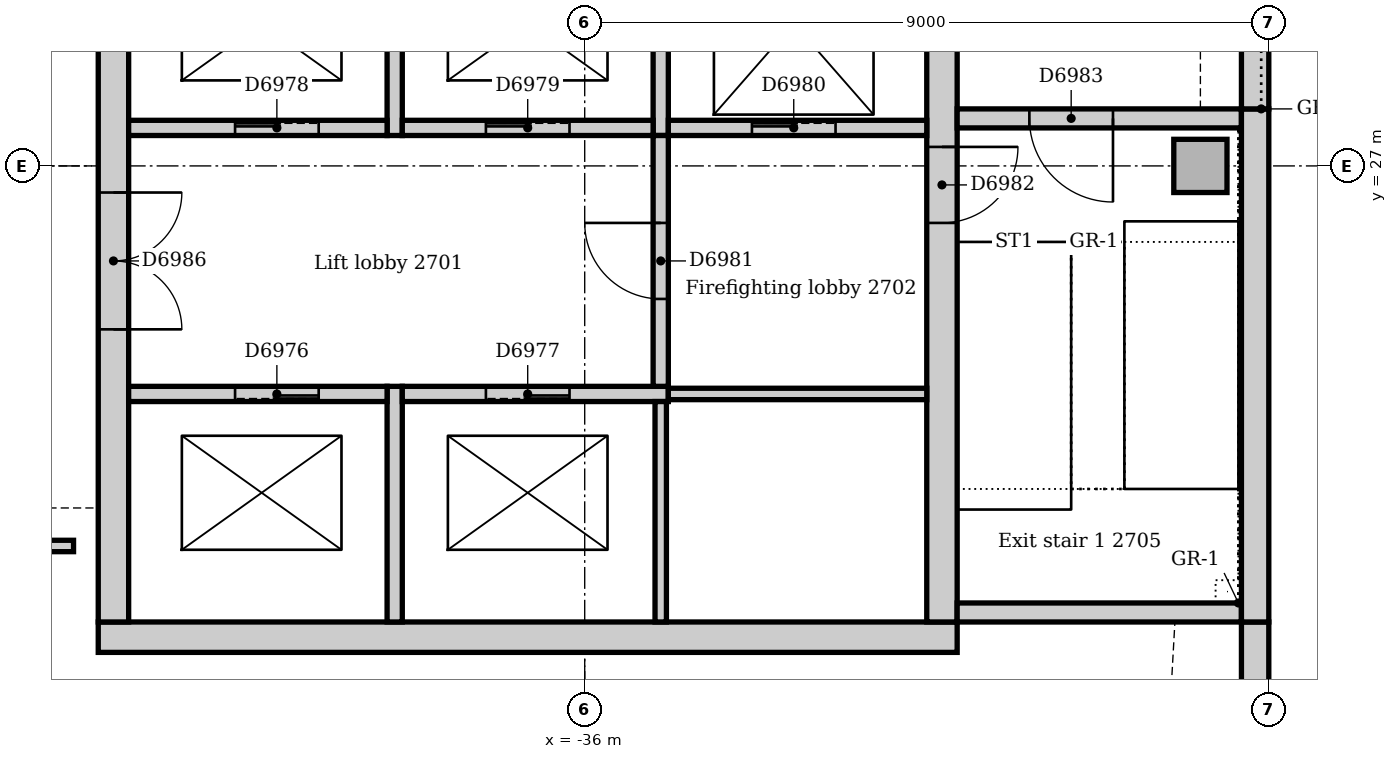
"""IFC4 building model, lengths in metres.
Left out: names, types, materials, properties, quantities, classifications, styles, units other than length and angle.
Written with IfcOpenShell. Run it as: python <this file> out.ifc"""

import sys

from ifc_helpers import new_model, si_unit, direction, frame, frame_2d, origin, origin_2d, place, context, subcontext, project, spatial, rectangle, extrude, element, fill, save


model = new_model("IFC4")
c1 = context("Model", 3, precision=1e-05, world=origin(), true_north=direction((0.0, 1.0)))
c2 = subcontext(c1, "Body", "Model", "MODEL_VIEW")
j1 = project(units=[si_unit("LENGTHUNIT", "METRE"), si_unit("PLANEANGLEUNIT", "RADIAN")], contexts=[c1])
p1 = place(None, origin())
s1 = spatial("IfcSite", under=j1, at=p1, CompositionType="ELEMENT")
p2 = place(p1, origin())
s2 = spatial("IfcBuilding", under=s1, at=p2, CompositionType="ELEMENT")
p3 = place(p2, frame((0.0, 0.0, 116.0)))
s3 = spatial("IfcBuildingStorey", under=s2, at=p3, CompositionType="ELEMENT", Elevation=116.0)
p4 = place(p3, frame((-42.4, 20.8, 0.0), z_axis=(0.0, 0.0, 1.0), x_axis=(1.0, 0.0, 0.0)))
e1 = element("IfcWall", 1, at=p4, inside=s3, PredefinedType="SOLIDWALL", context=c2, shape_type="SweptSolid", body=[
    extrude(rectangle(XDim=11.3, YDim=0.4, at=frame_2d((5.65, 0.0))), origin(), (0.0, 0.0, 1.0), 4.0),
])
p5 = place(p3, frame((-31.3, 21.0, 0.0), z_axis=(0.0, 0.0, 1.0), x_axis=(0.0, 1.0, 0.0)))
e2 = element("IfcWall", 2, at=p5, inside=s3, PredefinedType="SOLIDWALL", context=c2, shape_type="SweptSolid", body=[
    extrude(rectangle(XDim=9.5, YDim=0.4, at=frame_2d((4.75, 0.0))), origin(), (0.0, 0.0, 1.0), 4.0),
])
p6 = place(p5, frame((5.25, 0.0, 0.0)))
e3 = element("IfcOpeningElement", 3, at=p6, cuts=e2, PredefinedType="OPENING", context=c2, shape_type="SweptSolid", body=[
    extrude(rectangle(XDim=1.0, YDim=2.1, at=frame_2d((0.5, 1.05))), frame((0.0, 0.21, 0.0), z_axis=(0.0, -1.0, 0.0), x_axis=(1.0, 0.0, 0.0)), (0.0, 0.0, 1.0), 0.42),
])
p7 = place(p3, frame((-42.2, 30.5, 0.0), z_axis=(0.0, 0.0, 1.0), x_axis=(0.0, -1.0, 0.0)))
e4 = element("IfcWall", 4, at=p7, inside=s3, PredefinedType="SOLIDWALL", context=c2, shape_type="SweptSolid", body=[
    extrude(rectangle(XDim=9.5, YDim=0.4, at=frame_2d((4.75, 0.0))), origin(), (0.0, 0.0, 1.0), 4.0),
])
p8 = place(p7, frame((3.85, 0.0, 0.0)))
e5 = element("IfcOpeningElement", 5, at=p8, cuts=e4, PredefinedType="OPENING", context=c2, shape_type="SweptSolid", body=[
    extrude(rectangle(XDim=1.8, YDim=2.1, at=frame_2d((0.9, 1.05))), frame((0.0, 0.21, 0.0), z_axis=(0.0, -1.0, 0.0), x_axis=(1.0, 0.0, 0.0)), (0.0, 0.0, 1.0), 0.42),
])
p9 = place(p3, frame((-31.1, 21.125, 0.0), z_axis=(0.0, 0.0, 1.0), x_axis=(1.0, 0.0, 0.0)))
e6 = element("IfcWall", 6, at=p9, inside=s3, PredefinedType="SOLIDWALL", context=c2, shape_type="SweptSolid", body=[
    extrude(rectangle(XDim=3.74, YDim=0.25, at=frame_2d((1.87, 0.0))), origin(), (0.0, 0.0, 1.0), 4.0),
])
p10 = place(p3, frame((-27.36, 27.625, 0.0), z_axis=(0.0, 0.0, 1.0), x_axis=(-1.0, 0.0, 0.0)))
e7 = element("IfcWall", 7, at=p10, inside=s3, PredefinedType="SOLIDWALL", context=c2, shape_type="SweptSolid", body=[
    extrude(rectangle(XDim=3.74, YDim=0.25, at=frame_2d((1.87, 0.0))), origin(), (0.0, 0.0, 1.0), 4.0),
])
p11 = place(p10, frame((1.69, 0.0, 0.0)))
e8 = element("IfcOpeningElement", 8, at=p11, cuts=e7, PredefinedType="OPENING", context=c2, shape_type="SweptSolid", body=[
    extrude(rectangle(XDim=1.1, YDim=2.1, at=frame_2d((0.55, 1.05))), frame((0.0, 0.135, 0.0), z_axis=(0.0, -1.0, 0.0), x_axis=(1.0, 0.0, 0.0)), (0.0, 0.0, 1.0), 0.27),
])
p12 = place(p3, frame((-27.9, 27.0, 0.0), z_axis=(0.0, 0.0, 1.0), x_axis=(1.0, 0.0, 0.0)))
e9 = element("IfcColumn", 9, at=p12, inside=s3, PredefinedType="COLUMN", context=c2, shape_type="SweptSolid", body=[
    extrude(rectangle(XDim=0.7, YDim=0.7, at=origin_2d()), origin(), (0.0, 0.0, 1.0), 4.0),
])
p13 = place(p3, frame((-27.18, 17.743, 0.0), z_axis=(0.0, 0.0, 1.0), x_axis=(0.0, 1.0, 0.0)))
e10 = element("IfcWall", 10, at=p13, inside=s3, PredefinedType="STANDARD", context=c2, shape_type="SweptSolid", body=[
    extrude(rectangle(XDim=3.257, YDim=0.36, at=frame_2d((1.629, 0.0))), origin(), (0.0, 0.0, 1.0), 3.85),
])
p14 = place(p3, frame((-27.18, 21.0, 0.0), z_axis=(0.0, 0.0, 1.0), x_axis=(0.0, 1.0, 0.0)))
e11 = element("IfcWall", 11, at=p14, inside=s3, PredefinedType="STANDARD", context=c2, shape_type="SweptSolid", body=[
    extrude(rectangle(XDim=6.75, YDim=0.36, at=frame_2d((3.375, 0.0))), origin(), (0.0, 0.0, 1.0), 3.85),
])
p15 = place(p3, frame((-27.18, 27.75, 0.0), z_axis=(0.0, 0.0, 1.0), x_axis=(0.0, 1.0, 0.0)))
e12 = element("IfcWall", 12, at=p15, inside=s3, PredefinedType="STANDARD", context=c2, shape_type="SweptSolid", body=[
    extrude(rectangle(XDim=7.5, YDim=0.36, at=frame_2d((3.75, 0.0))), origin(), (0.0, 0.0, 1.0), 3.85),
])
p16 = place(p15, frame((2.85, 0.0, 1.2)))
e13 = element("IfcOpeningElement", 13, at=p16, cuts=e12, PredefinedType="OPENING", context=c2, shape_type="SweptSolid", body=[
    extrude(rectangle(XDim=1.8, YDim=1.2, at=frame_2d((0.9, 0.6))), frame((0.0, 0.19, 0.0), z_axis=(0.0, -1.0, 0.0), x_axis=(1.0, 0.0, 0.0)), (0.0, 0.0, 1.0), 0.38),
])
p17 = place(p3, frame((-38.5, 21.0, 0.0), z_axis=(0.0, 0.0, 1.0), x_axis=(0.0, 1.0, 0.0)))
e14 = element("IfcWall", 14, at=p17, inside=s3, PredefinedType="SOLIDWALL", context=c2, shape_type="SweptSolid", body=[
    extrude(rectangle(XDim=3.1, YDim=0.2, at=frame_2d((1.55, 0.0))), origin(), (0.0, 0.0, 1.0), 4.0),
])
p18 = place(p3, frame((-38.6, 24.0, 0.0), z_axis=(0.0, 0.0, 1.0), x_axis=(-1.0, 0.0, 0.0)))
e15 = element("IfcWall", 15, at=p18, inside=s3, PredefinedType="SOLIDWALL", context=c2, shape_type="SweptSolid", body=[
    extrude(rectangle(XDim=3.4, YDim=0.2, at=frame_2d((1.7, 0.0))), origin(), (0.0, 0.0, 1.0), 4.0),
])
p19 = place(p18, frame((0.9, 0.0, 0.0)))
e16 = element("IfcOpeningElement", 16, at=p19, cuts=e15, PredefinedType="OPENING", context=c2, shape_type="SweptSolid", body=[
    extrude(rectangle(XDim=1.1, YDim=2.1, at=frame_2d((0.55, 1.05))), frame((0.0, 0.11, 0.0), z_axis=(0.0, -1.0, 0.0), x_axis=(1.0, 0.0, 0.0)), (0.0, 0.0, 1.0), 0.22),
])
p20 = place(p3, frame((-34.9, 24.0, 0.0), z_axis=(0.0, 0.0, 1.0), x_axis=(-1.0, 0.0, 0.0)))
e17 = element("IfcWall", 17, at=p20, inside=s3, PredefinedType="SOLIDWALL", context=c2, shape_type="SweptSolid", body=[
    extrude(rectangle(XDim=3.5, YDim=0.2, at=frame_2d((1.75, 0.0))), origin(), (0.0, 0.0, 1.0), 4.0),
])
p21 = place(p20, frame((1.3, 0.0, 0.0)))
e18 = element("IfcOpeningElement", 18, at=p21, cuts=e17, PredefinedType="OPENING", context=c2, shape_type="SweptSolid", body=[
    extrude(rectangle(XDim=1.1, YDim=2.1, at=frame_2d((0.55, 1.05))), frame((0.0, 0.11, 0.0), z_axis=(0.0, -1.0, 0.0), x_axis=(1.0, 0.0, 0.0)), (0.0, 0.0, 1.0), 0.22),
])
p22 = place(p3, frame((-38.5, 27.4, 0.0), z_axis=(0.0, 0.0, 1.0), x_axis=(0.0, 1.0, 0.0)))
e19 = element("IfcWall", 19, at=p22, inside=s3, PredefinedType="SOLIDWALL", context=c2, shape_type="SweptSolid", body=[
    extrude(rectangle(XDim=2.85, YDim=0.2, at=frame_2d((1.425, 0.0))), origin(), (0.0, 0.0, 1.0), 4.0),
])
p23 = place(p3, frame((-42.0, 27.5, 0.0), z_axis=(0.0, 0.0, 1.0), x_axis=(1.0, 0.0, 0.0)))
e20 = element("IfcWall", 20, at=p23, inside=s3, PredefinedType="SOLIDWALL", context=c2, shape_type="SweptSolid", body=[
    extrude(rectangle(XDim=3.4, YDim=0.2, at=frame_2d((1.7, 0.0))), origin(), (0.0, 0.0, 1.0), 4.0),
])
p24 = place(p23, frame((1.4, 0.0, 0.0)))
e21 = element("IfcOpeningElement", 21, at=p24, cuts=e20, PredefinedType="OPENING", context=c2, shape_type="SweptSolid", body=[
    extrude(rectangle(XDim=1.1, YDim=2.1, at=frame_2d((0.55, 1.05))), frame((0.0, 0.11, 0.0), z_axis=(0.0, -1.0, 0.0), x_axis=(1.0, 0.0, 0.0)), (0.0, 0.0, 1.0), 0.22),
])
p25 = place(p3, frame((-35.0, 27.4, 0.0), z_axis=(0.0, 0.0, 1.0), x_axis=(0.0, 1.0, 0.0)))
e22 = element("IfcWall", 22, at=p25, inside=s3, PredefinedType="SOLIDWALL", context=c2, shape_type="SweptSolid", body=[
    extrude(rectangle(XDim=2.85, YDim=0.2, at=frame_2d((1.425, 0.0))), origin(), (0.0, 0.0, 1.0), 4.0),
])
p26 = place(p3, frame((-38.4, 27.5, 0.0), z_axis=(0.0, 0.0, 1.0), x_axis=(1.0, 0.0, 0.0)))
e23 = element("IfcWall", 23, at=p26, inside=s3, PredefinedType="SOLIDWALL", context=c2, shape_type="SweptSolid", body=[
    extrude(rectangle(XDim=3.3, YDim=0.2, at=frame_2d((1.65, 0.0))), origin(), (0.0, 0.0, 1.0), 4.0),
])
p27 = place(p26, frame((1.1, 0.0, 0.0)))
e24 = element("IfcOpeningElement", 24, at=p27, cuts=e23, PredefinedType="OPENING", context=c2, shape_type="SweptSolid", body=[
    extrude(rectangle(XDim=1.1, YDim=2.1, at=frame_2d((0.55, 1.05))), frame((0.0, 0.11, 0.0), z_axis=(0.0, -1.0, 0.0), x_axis=(1.0, 0.0, 0.0)), (0.0, 0.0, 1.0), 0.22),
])
p28 = place(p3, frame((-34.9, 27.5, 0.0), z_axis=(0.0, 0.0, 1.0), x_axis=(1.0, 0.0, 0.0)))
e25 = element("IfcWall", 25, at=p28, inside=s3, PredefinedType="SOLIDWALL", context=c2, shape_type="SweptSolid", body=[
    extrude(rectangle(XDim=3.4, YDim=0.2, at=frame_2d((1.7, 0.0))), origin(), (0.0, 0.0, 1.0), 4.0),
])
p29 = place(p28, frame((1.1, 0.0, 0.0)))
e26 = element("IfcOpeningElement", 26, at=p29, cuts=e25, PredefinedType="OPENING", context=c2, shape_type="SweptSolid", body=[
    extrude(rectangle(XDim=1.1, YDim=2.1, at=frame_2d((0.55, 1.05))), frame((0.0, 0.11, 0.0), z_axis=(0.0, -1.0, 0.0), x_axis=(1.0, 0.0, 0.0)), (0.0, 0.0, 1.0), 0.22),
])
p30 = place(p3, frame((-35.0, 24.1, 0.0), z_axis=(0.0, 0.0, 1.0), x_axis=(0.0, 1.0, 0.0)))
e27 = element("IfcWall", 27, at=p30, inside=s3, PredefinedType="SOLIDWALL", context=c2, shape_type="SweptSolid", body=[
    extrude(rectangle(XDim=3.3, YDim=0.2, at=frame_2d((1.65, 0.0))), origin(), (0.0, 0.0, 1.0), 4.0),
])
p31 = place(p30, frame((1.15, 0.0, 0.0)))
e28 = element("IfcOpeningElement", 28, at=p31, cuts=e27, PredefinedType="OPENING", context=c2, shape_type="SweptSolid", body=[
    extrude(rectangle(XDim=1.0, YDim=2.1, at=frame_2d((0.5, 1.05))), frame((0.0, 0.11, 0.0), z_axis=(0.0, -1.0, 0.0), x_axis=(1.0, 0.0, 0.0)), (0.0, 0.0, 1.0), 0.22),
])
p32 = place(p3, frame((-35.0, 21.0, 0.0), z_axis=(0.0, 0.0, 1.0), x_axis=(0.0, 1.0, 0.0)))
e29 = element("IfcWall", 29, at=p32, inside=s3, PredefinedType="SOLIDWALL", context=c2, shape_type="SweptSolid", body=[
    extrude(rectangle(XDim=2.9, YDim=0.15, at=frame_2d((1.45, 0.0))), origin(), (0.0, 0.0, 1.0), 4.0),
])
p33 = place(p3, frame((-31.5, 24.0, 0.0), z_axis=(0.0, 0.0, 1.0), x_axis=(-1.0, 0.0, 0.0)))
e30 = element("IfcWall", 30, at=p33, inside=s3, PredefinedType="SOLIDWALL", context=c2, shape_type="SweptSolid", body=[
    extrude(rectangle(XDim=3.4, YDim=0.15, at=frame_2d((1.7, 0.0))), origin(), (0.0, 0.0, 1.0), 4.0),
])
p34 = place(p3, frame((-59.766, 22.0, 0.0), z_axis=(0.0, 0.0, 1.0), x_axis=(1.0, 0.0, 0.0)))
e31 = element("IfcWall", 31, at=p34, inside=s3, PredefinedType="PARTITIONING", context=c2, shape_type="SweptSolid", body=[
    extrude(rectangle(XDim=17.041, YDim=0.15, at=frame_2d((8.52, 0.0))), origin(), (0.0, 0.0, 1.0), 3.85),
])
p35 = place(p34, frame((15.366, 0.0, 0.0)))
e32 = element("IfcOpeningElement", 32, at=p35, cuts=e31, PredefinedType="OPENING", context=c2, shape_type="SweptSolid", body=[
    extrude(rectangle(XDim=0.9, YDim=2.1, at=frame_2d((0.45, 1.05))), frame((0.0, 0.085, 0.0), z_axis=(0.0, -1.0, 0.0), x_axis=(1.0, 0.0, 0.0)), (0.0, 0.0, 1.0), 0.17),
])
p36 = place(p34, frame((2.5, 0.0, 0.0)))
e33 = element("IfcOpeningElement", 33, at=p36, cuts=e31, PredefinedType="OPENING", context=c2, shape_type="SweptSolid", body=[
    extrude(rectangle(XDim=0.9, YDim=2.1, at=frame_2d((0.45, 1.05))), frame((0.0, 0.085, 0.0), z_axis=(0.0, -1.0, 0.0), x_axis=(1.0, 0.0, 0.0)), (0.0, 0.0, 1.0), 0.17),
])
p37 = place(p34, frame((9.056, 0.0, 0.0)))
e34 = element("IfcOpeningElement", 34, at=p37, cuts=e31, PredefinedType="OPENING", context=c2, shape_type="SweptSolid", body=[
    extrude(rectangle(XDim=1.0, YDim=2.1, at=frame_2d((0.5, 1.05))), frame((0.0, 0.085, 0.0), z_axis=(0.0, -1.0, 0.0), x_axis=(1.0, 0.0, 0.0)), (0.0, 0.0, 1.0), 0.17),
])
p38 = place(p19, origin())
e35 = element("IfcDoor", 35, at=p38, inside=s3, OperationType="SLIDING_TO_LEFT", PredefinedType="DOOR", context=c2, shape_type="SweptSolid", body=[
    extrude(rectangle(XDim=1.1, YDim=2.1, at=frame_2d((0.55, 1.05))), frame((0.0, 0.025, 0.0), z_axis=(0.0, -1.0, 0.0), x_axis=(1.0, 0.0, 0.0)), (0.0, 0.0, 1.0), 0.05),
])
fill(e16, e35)
p39 = place(p21, origin())
e36 = element("IfcDoor", 36, at=p39, inside=s3, OperationType="SLIDING_TO_LEFT", PredefinedType="DOOR", context=c2, shape_type="SweptSolid", body=[
    extrude(rectangle(XDim=1.1, YDim=2.1, at=frame_2d((0.55, 1.05))), frame((0.0, 0.025, 0.0), z_axis=(0.0, -1.0, 0.0), x_axis=(1.0, 0.0, 0.0)), (0.0, 0.0, 1.0), 0.05),
])
fill(e18, e36)
p40 = place(p24, origin())
e37 = element("IfcDoor", 37, at=p40, inside=s3, OperationType="SLIDING_TO_LEFT", PredefinedType="DOOR", context=c2, shape_type="SweptSolid", body=[
    extrude(rectangle(XDim=1.1, YDim=2.1, at=frame_2d((0.55, 1.05))), frame((0.0, 0.025, 0.0), z_axis=(0.0, -1.0, 0.0), x_axis=(1.0, 0.0, 0.0)), (0.0, 0.0, 1.0), 0.05),
])
fill(e21, e37)
p41 = place(p27, origin())
e38 = element("IfcDoor", 38, at=p41, inside=s3, OperationType="SLIDING_TO_LEFT", PredefinedType="DOOR", context=c2, shape_type="SweptSolid", body=[
    extrude(rectangle(XDim=1.1, YDim=2.1, at=frame_2d((0.55, 1.05))), frame((0.0, 0.025, 0.0), z_axis=(0.0, -1.0, 0.0), x_axis=(1.0, 0.0, 0.0)), (0.0, 0.0, 1.0), 0.05),
])
fill(e24, e38)
p42 = place(p29, origin())
e39 = element("IfcDoor", 39, at=p42, inside=s3, OperationType="SLIDING_TO_LEFT", PredefinedType="DOOR", context=c2, shape_type="SweptSolid", body=[
    extrude(rectangle(XDim=1.1, YDim=2.1, at=frame_2d((0.55, 1.05))), frame((0.0, 0.025, 0.0), z_axis=(0.0, -1.0, 0.0), x_axis=(1.0, 0.0, 0.0)), (0.0, 0.0, 1.0), 0.05),
])
fill(e26, e39)
p43 = place(p31, origin())
e40 = element("IfcDoor", 40, at=p43, inside=s3, OperationType="SINGLE_SWING_RIGHT", PredefinedType="DOOR", context=c2, shape_type="SweptSolid", body=[
    extrude(rectangle(XDim=1.0, YDim=2.1, at=frame_2d((0.5, 1.05))), frame((0.0, 0.025, 0.0), z_axis=(0.0, -1.0, 0.0), x_axis=(1.0, 0.0, 0.0)), (0.0, 0.0, 1.0), 0.05),
])
fill(e28, e40)
p44 = place(p6, frame((1.0, 0.0, 0.0), z_axis=(0.0, 0.0, 1.0), x_axis=(-1.0, 0.0, 0.0)))
e41 = element("IfcDoor", 41, at=p44, inside=s3, OperationType="SINGLE_SWING_LEFT", PredefinedType="DOOR", context=c2, shape_type="SweptSolid", body=[
    extrude(rectangle(XDim=1.0, YDim=2.1, at=frame_2d((0.5, 1.05))), frame((0.0, 0.025, 0.0), z_axis=(0.0, -1.0, 0.0), x_axis=(1.0, 0.0, 0.0)), (0.0, 0.0, 1.0), 0.05),
])
fill(e3, e41)
p45 = place(p11, origin())
e42 = element("IfcDoor", 42, at=p45, inside=s3, OperationType="SINGLE_SWING_LEFT", PredefinedType="DOOR", context=c2, shape_type="SweptSolid", body=[
    extrude(rectangle(XDim=1.1, YDim=2.1, at=frame_2d((0.55, 1.05))), frame((0.0, 0.025, 0.0), z_axis=(0.0, -1.0, 0.0), x_axis=(1.0, 0.0, 0.0)), (0.0, 0.0, 1.0), 0.05),
])
fill(e8, e42)
p46 = place(p8, origin())
e43 = element("IfcDoor", 43, at=p46, inside=s3, OperationType="DOUBLE_DOOR_SINGLE_SWING", PredefinedType="DOOR", context=c2, shape_type="SweptSolid", body=[
    extrude(rectangle(XDim=1.8, YDim=2.1, at=frame_2d((0.9, 1.05))), frame((0.0, 0.025, 0.0), z_axis=(0.0, -1.0, 0.0), x_axis=(1.0, 0.0, 0.0)), (0.0, 0.0, 1.0), 0.05),
])
fill(e5, e43)
save(model, sys.argv[1])
